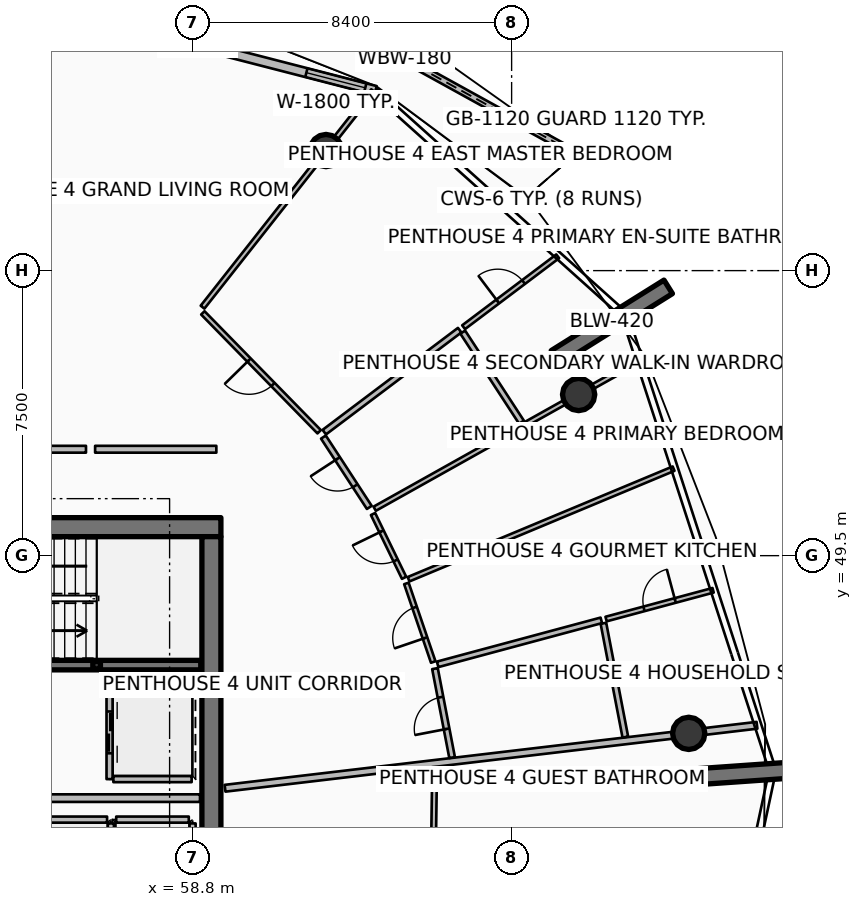
"""IFC4 building model, lengths in metres.
Left out: names, types, materials, properties, quantities, classifications, styles, units other than length and angle.
Written with IfcOpenShell. Run it as: python <this file> out.ifc"""

import sys

from ifc_helpers import new_model, si_unit, direction, frame, frame_2d, origin, origin_2d, place, context, subcontext, project, spatial, polyline, rectangle, hollow_rectangle, circle, outline, extrude, element, fill, save


model = new_model("IFC4")
c1 = context("Model", 3, precision=1e-05, world=origin(), true_north=direction((0.0, 1.0)))
c2 = subcontext(c1, "Body", "Model", "MODEL_VIEW")
j1 = project(units=[si_unit("LENGTHUNIT", "METRE"), si_unit("PLANEANGLEUNIT", "RADIAN")], contexts=[c1])
p1 = place(None, origin())
s1 = spatial("IfcSite", under=j1, at=p1, CompositionType="ELEMENT")
p2 = place(p1, origin())
s2 = spatial("IfcBuilding", under=s1, at=p2, CompositionType="ELEMENT")
p3 = place(p2, frame((0.0, 0.0, 338.9)))
s3 = spatial("IfcBuildingStorey", under=s2, at=p3, CompositionType="ELEMENT", Elevation=338.9)
p4 = place(p3, frame((49.95, 50.25, 0.0), z_axis=(0.0, 0.0, 1.0), x_axis=(1.0, 0.0, 0.0)))
e1 = element("IfcWall", 1, at=p4, inside=s3, PredefinedType="SHEAR", context=c2, shape_type="SweptSolid", body=[
    extrude(rectangle(XDim=9.6, YDim=0.5, at=frame_2d((4.8, 0.0))), origin(), (0.0, 0.0, 1.0), 4.2),
])
p5 = place(p3, frame((59.3, 34.0, 0.0), z_axis=(0.0, 0.0, 1.0), x_axis=(0.0, 1.0, 0.0)))
e2 = element("IfcWall", 2, at=p5, inside=s3, PredefinedType="SHEAR", context=c2, shape_type="SweptSolid", body=[
    extrude(rectangle(XDim=16.0, YDim=0.5, at=frame_2d((8.0, 0.0))), origin(), (0.0, 0.0, 1.0), 4.2),
])
p6 = place(p3, frame((56.28, 46.62, 0.0), z_axis=(0.0, 0.0, 1.0), x_axis=(1.0, 0.0, 0.0)))
e3 = element("IfcColumn", 3, at=p6, inside=s3, PredefinedType="COLUMN", context=c2, shape_type="SweptSolid", body=[
    extrude(hollow_rectangle(XDim=0.2, YDim=0.2, WallThickness=0.01, InnerFilletRadius=0.01, OuterFilletRadius=0.02, at=origin_2d()), origin(), (0.0, 0.0, 1.0), 1.895),
])
for number, where, z_axis, x_axis in (
    (4, (68.353, 54.718, 0.0), (0.0, 0.0, 1.0), (0.848, 0.53, 0.0)),
    (5, (71.941, 43.674, 0.0), (0.0, 0.0, 1.0), (0.998, 0.07, 0.0)),
):
    element("IfcWall", number, at=place(p3, frame(where, z_axis=z_axis, x_axis=x_axis)), inside=s3, PredefinedType="SOLIDWALL", context=c2, shape_type="SweptSolid", body=[
        extrude(rectangle(XDim=3.5, YDim=0.42, at=frame_2d((1.75, 0.0))), origin(), (0.0, 0.0, 1.0), 4.2),
    ])
for number, where, z_axis, x_axis in (
    (6, (68.963, 53.74, 0.0), (0.0, 0.0, 1.0), (1.0, 0.0, 0.0)),
    (7, (62.316, 60.159, 0.0), (0.0, 0.0, 1.0), (1.0, 0.0, 0.0)),
    (8, (71.86, 44.824, 0.0), (0.0, 0.0, 1.0), (1.0, 0.0, 0.0)),
):
    element("IfcColumn", number, at=place(p3, frame(where, z_axis=z_axis, x_axis=x_axis)), inside=s3, PredefinedType="COLUMN", context=c2, shape_type="SweptSolid", body=[
        extrude(circle(Radius=0.425, at=origin_2d()), origin(), (0.0, 0.0, 1.0), 3.8),
    ])
p7 = place(p3, frame((68.897, 60.07, 0.0), z_axis=(0.0, 0.0, 1.0), x_axis=(-0.875469817093, 0.483272800145, 0.0)))
e9 = element("IfcWall", 9, at=p7, inside=s3, PredefinedType="PARAPET", context=c2, shape_type="SweptSolid", body=[
    extrude(outline(polyline([(0.0, 0.0), (10.302, 0.0), (10.302, 1.148), (5.151, 1.127), (0.0, 1.224), (0.0, 0.0)])), frame((0.0, 0.09, 0.0), z_axis=(0.0, -1.0, 0.0), x_axis=(1.0, 0.0, 0.0)), (0.0, 0.0, 1.0), 0.18),
])
p8 = place(p3, frame((63.62, 61.74, 0.0), z_axis=(0.0, 0.0, 1.0), x_axis=(-0.968389062354, 0.249444630957, 0.0)))
e10 = element("IfcWall", 10, at=p8, inside=s3, PredefinedType="SOLIDWALL", context=c2, shape_type="SweptSolid", body=[
    extrude(rectangle(XDim=9.678, YDim=0.24, at=frame_2d((4.839, 0.0))), origin(), (0.0, 0.0, 1.0), 2.75),
])
p9 = place(p8, frame((7.458, 0.0, 0.0)))
e11 = element("IfcOpeningElement", 11, at=p9, cuts=e10, PredefinedType="OPENING", context=c2, shape_type="SweptSolid", body=[
    extrude(rectangle(XDim=1.45, YDim=2.15, at=frame_2d((0.725, 1.075))), frame((0.0, 0.13, 0.0), z_axis=(0.0, -1.0, 0.0), x_axis=(1.0, 0.0, 0.0)), (0.0, 0.0, 1.0), 0.26),
])
p10 = place(p8, frame((0.28, 0.0, 0.65)))
e12 = element("IfcOpeningElement", 12, at=p10, cuts=e10, PredefinedType="OPENING", context=c2, shape_type="SweptSolid", body=[
    extrude(rectangle(XDim=1.6, YDim=1.5, at=frame_2d((0.8, 0.75))), frame((0.0, 0.13, 0.0), z_axis=(0.0, -1.0, 0.0), x_axis=(1.0, 0.0, 0.0)), (0.0, 0.0, 1.0), 0.26),
])
p11 = place(p3, frame((51.48, 46.62, 0.0), z_axis=(0.0, 0.0, 1.0), x_axis=(1.0, 0.0, 0.0)))
e13 = element("IfcWall", 13, at=p11, inside=s3, PredefinedType="SOLIDWALL", context=c2, shape_type="SweptSolid", body=[
    extrude(rectangle(XDim=7.54, YDim=0.25, at=frame_2d((3.77, 0.0))), origin(), (0.0, 0.0, 1.0), 3.8),
])
p12 = place(p11, frame((0.3, 0.0, 0.0)))
e14 = element("IfcOpeningElement", 14, at=p12, cuts=e13, PredefinedType="OPENING", context=c2, shape_type="SweptSolid", body=[
    extrude(rectangle(XDim=1.55, YDim=2.15, at=frame_2d((0.775, 1.075))), frame((0.0, 0.135, 0.0), z_axis=(0.0, -1.0, 0.0), x_axis=(1.0, 0.0, 0.0)), (0.0, 0.0, 1.0), 0.27),
])
p13 = place(p3, frame((56.655, 40.845, 0.0), z_axis=(0.0, 0.0, 1.0), x_axis=(0.0, 1.0, 0.0)))
e15 = element("IfcWall", 15, at=p13, inside=s3, PredefinedType="PARTITIONING", context=c2, shape_type="SweptSolid", body=[
    extrude(rectangle(XDim=1.61, YDim=0.16, at=frame_2d((0.805, 0.0))), origin(), (0.0, 0.0, 1.0), 3.8),
])
p14 = place(p3, frame((54.645, 42.555, 0.0), z_axis=(0.0, 0.0, 1.0), x_axis=(1.0, 0.0, 0.0)))
e16 = element("IfcWall", 16, at=p14, inside=s3, PredefinedType="PARTITIONING", context=c2, shape_type="SweptSolid", body=[
    extrude(rectangle(XDim=1.91, YDim=0.16, at=frame_2d((0.955, 0.0))), origin(), (0.0, 0.0, 1.0), 3.8),
])
p15 = place(p3, frame((58.805, 40.845, 0.0), z_axis=(0.0, 0.0, 1.0), x_axis=(0.0, 1.0, 0.0)))
e17 = element("IfcWall", 17, at=p15, inside=s3, PredefinedType="PARTITIONING", context=c2, shape_type="SweptSolid", body=[
    extrude(rectangle(XDim=1.61, YDim=0.16, at=frame_2d((0.805, 0.0))), origin(), (0.0, 0.0, 1.0), 3.8),
])
p16 = place(p3, frame((56.795, 42.555, 0.0), z_axis=(0.0, 0.0, 1.0), x_axis=(1.0, 0.0, 0.0)))
e18 = element("IfcWall", 18, at=p16, inside=s3, PredefinedType="PARTITIONING", context=c2, shape_type="SweptSolid", body=[
    extrude(rectangle(XDim=1.91, YDim=0.16, at=frame_2d((0.955, 0.0))), origin(), (0.0, 0.0, 1.0), 3.8),
])
p17 = place(p3, frame((56.62, 46.08, 0.0), z_axis=(0.0, 0.0, 1.0), x_axis=(0.0, -1.0, 0.0)))
e19 = element("IfcWall", 19, at=p17, inside=s3, PredefinedType="PARTITIONING", context=c2, shape_type="SweptSolid", body=[
    extrude(rectangle(XDim=2.46, YDim=0.16, at=frame_2d((1.23, 0.0))), origin(), (0.0, 0.0, 1.0), 3.8),
])
p18 = place(p17, frame((0.68, 0.0, 0.0)))
e20 = element("IfcOpeningElement", 20, at=p18, cuts=e19, PredefinedType="OPENING", context=c2, shape_type="SweptSolid", body=[
    extrude(rectangle(XDim=1.1, YDim=2.1, at=frame_2d((0.55, 1.05))), frame((0.0, 0.09, 0.0), z_axis=(0.0, -1.0, 0.0), x_axis=(1.0, 0.0, 0.0)), (0.0, 0.0, 1.0), 0.18),
])
for number, where, z_axis, x_axis in (
    (21, (56.72, 46.08, 0.0), (0.0, 0.0, 1.0), (1.0, 0.0, 0.0)),
    (22, (56.72, 43.62, 0.0), (0.0, 0.0, 1.0), (1.0, 0.0, 0.0)),
):
    element("IfcWall", number, at=place(p3, frame(where, z_axis=z_axis, x_axis=x_axis)), inside=s3, PredefinedType="PARTITIONING", context=c2, shape_type="SweptSolid", body=[
        extrude(rectangle(XDim=2.06, YDim=0.16, at=frame_2d((1.03, 0.0))), origin(), (0.0, 0.0, 1.0), 3.8),
    ])
p19 = place(p3, frame((50.12, 43.12, 0.0), z_axis=(0.0, 0.0, 1.0), x_axis=(1.0, 0.0, 0.0)))
e23 = element("IfcWall", 23, at=p19, inside=s3, PredefinedType="PARTITIONING", context=c2, shape_type="SweptSolid", body=[
    extrude(rectangle(XDim=8.88, YDim=0.2, at=frame_2d((4.44, 0.0))), origin(), (0.0, 0.0, 1.0), 3.8),
])
p20 = place(p3, frame((59.659, 43.38, 0.0), z_axis=(0.0, 0.0, 1.0), x_axis=(0.993068307517, 0.117538660041, 0.0)))
e24 = element("IfcWall", 24, at=p20, inside=s3, PredefinedType="PARTITIONING", context=c2, shape_type="SweptSolid", body=[
    extrude(rectangle(XDim=14.095, YDim=0.18, at=frame_2d((7.048, 0.0))), origin(), (0.0, 0.0, 1.0), 3.24),
])
p21 = place(p3, frame((65.11, 39.542, 0.0), z_axis=(0.0, 0.0, 1.0), x_axis=(0.014677317906, 0.999892282368, 0.0)))
e25 = element("IfcWall", 25, at=p21, inside=s3, PredefinedType="PARTITIONING", context=c2, shape_type="SweptSolid", body=[
    extrude(rectangle(XDim=4.391, YDim=0.125, at=frame_2d((2.196, 0.0))), origin(), (0.0, 0.0, 1.0), 3.24),
])
p22 = place(p21, frame((1.746, 0.0, 0.0)))
e26 = element("IfcOpeningElement", 26, at=p22, cuts=e25, PredefinedType="OPENING", context=c2, shape_type="SweptSolid", body=[
    extrude(rectangle(XDim=0.9, YDim=2.08, at=frame_2d((0.45, 1.04))), frame((0.0, 0.073, 0.0), z_axis=(0.0, -1.0, 0.0), x_axis=(1.0, 0.0, 0.0)), (0.0, 0.0, 1.0), 0.145),
])
p23 = place(p3, frame((56.0, 52.3, 0.0), z_axis=(0.0, 0.0, 1.0), x_axis=(-1.0, 0.0, 0.0)))
e27 = element("IfcWall", 27, at=p23, inside=s3, PredefinedType="PARTITIONING", context=c2, shape_type="SweptSolid", body=[
    extrude(rectangle(XDim=4.975, YDim=0.18, at=frame_2d((2.488, 0.0))), origin(), (0.0, 0.0, 1.0), 3.24),
])
p24 = place(p23, frame((1.938, 0.0, 0.0)))
e28 = element("IfcOpeningElement", 28, at=p24, cuts=e27, PredefinedType="OPENING", context=c2, shape_type="SweptSolid", body=[
    extrude(rectangle(XDim=1.1, YDim=2.1, at=frame_2d((0.55, 1.05))), frame((0.0, 0.1, 0.0), z_axis=(0.0, -1.0, 0.0), x_axis=(1.0, 0.0, 0.0)), (0.0, 0.0, 1.0), 0.2),
])
p25 = place(p3, frame((65.634, 44.188, 0.0), z_axis=(0.0, 0.0, 1.0), x_axis=(-0.189079126285, 0.981961854658, 0.0)))
e29 = element("IfcWall", 29, at=p25, inside=s3, PredefinedType="PARTITIONING", context=c2, shape_type="SweptSolid", body=[
    extrude(rectangle(XDim=2.384, YDim=0.15, at=frame_2d((1.192, 0.0))), origin(), (0.0, 0.0, 1.0), 3.24),
])
p26 = place(p25, frame((0.767, 0.0, 0.0)))
e30 = element("IfcOpeningElement", 30, at=p26, cuts=e29, PredefinedType="OPENING", context=c2, shape_type="SweptSolid", body=[
    extrude(rectangle(XDim=0.85, YDim=2.06, at=frame_2d((0.425, 1.03))), frame((0.0, 0.085, 0.0), z_axis=(0.0, -1.0, 0.0), x_axis=(1.0, 0.0, 0.0)), (0.0, 0.0, 1.0), 0.17),
])
p27 = place(p3, frame((70.192, 44.727, 0.0), z_axis=(0.0, 0.0, 1.0), x_axis=(-0.189180095144, 0.981942407477, 0.0)))
e31 = element("IfcWall", 31, at=p27, inside=s3, PredefinedType="PARTITIONING", context=c2, shape_type="SweptSolid", body=[
    extrude(rectangle(XDim=3.048, YDim=0.15, at=frame_2d((1.524, 0.0))), origin(), (0.0, 0.0, 1.0), 3.24),
])
p28 = place(p3, frame((65.253, 46.64, 0.0), z_axis=(0.0, 0.0, 1.0), x_axis=(0.96569498994, 0.259679006477, 0.0)))
e32 = element("IfcWall", 32, at=p28, inside=s3, PredefinedType="PARTITIONING", context=c2, shape_type="SweptSolid", body=[
    extrude(rectangle(XDim=4.46, YDim=0.15, at=frame_2d((2.23, 0.0))), origin(), (0.0, 0.0, 1.0), 3.24),
])
p29 = place(p3, frame((69.686, 47.832, 0.0), z_axis=(0.0, 0.0, 1.0), x_axis=(0.965675542132, 0.259751318242, 0.0)))
e33 = element("IfcWall", 33, at=p29, inside=s3, PredefinedType="PARTITIONING", context=c2, shape_type="SweptSolid", body=[
    extrude(rectangle(XDim=2.917, YDim=0.125, at=frame_2d((1.458, 0.0))), origin(), (0.0, 0.0, 1.0), 3.24),
])
p30 = place(p29, frame((1.033, 0.0, 0.0)))
e34 = element("IfcOpeningElement", 34, at=p30, cuts=e33, PredefinedType="OPENING", context=c2, shape_type="SweptSolid", body=[
    extrude(rectangle(XDim=0.85, YDim=2.06, at=frame_2d((0.425, 1.03))), frame((0.0, 0.073, 0.0), z_axis=(0.0, -1.0, 0.0), x_axis=(1.0, 0.0, 0.0)), (0.0, 0.0, 1.0), 0.145),
])
p31 = place(p3, frame((64.488, 48.88, 0.0), z_axis=(0.0, 0.0, 1.0), x_axis=(0.922882765435, 0.385081032075, 0.0)))
e35 = element("IfcWall", 35, at=p31, inside=s3, PredefinedType="PARTITIONING", context=c2, shape_type="SweptSolid", body=[
    extrude(rectangle(XDim=7.557, YDim=0.125, at=frame_2d((3.778, 0.0))), origin(), (0.0, 0.0, 1.0), 3.24),
])
p32 = place(p3, frame((65.137, 46.702, 0.0), z_axis=(0.0, 0.0, 1.0), x_axis=(-0.323158498211, 0.946344855237, 0.0)))
e36 = element("IfcWall", 36, at=p32, inside=s3, PredefinedType="PARTITIONING", context=c2, shape_type="SweptSolid", body=[
    extrude(rectangle(XDim=2.185, YDim=0.125, at=frame_2d((1.092, 0.0))), origin(), (0.0, 0.0, 1.0), 3.24),
])
p33 = place(p32, frame((0.667, 0.0, 0.0)))
e37 = element("IfcOpeningElement", 37, at=p33, cuts=e36, PredefinedType="OPENING", context=c2, shape_type="SweptSolid", body=[
    extrude(rectangle(XDim=0.85, YDim=2.06, at=frame_2d((0.425, 1.03))), frame((0.0, 0.073, 0.0), z_axis=(0.0, -1.0, 0.0), x_axis=(1.0, 0.0, 0.0)), (0.0, 0.0, 1.0), 0.145),
])
p34 = place(p3, frame((64.37, 48.917, 0.0), z_axis=(0.0, 0.0, 1.0), x_axis=(-0.437562887643, 0.899187810948, 0.0)))
e38 = element("IfcWall", 38, at=p34, inside=s3, PredefinedType="PARTITIONING", context=c2, shape_type="SweptSolid", body=[
    extrude(rectangle(XDim=1.867, YDim=0.125, at=frame_2d((0.934, 0.0))), origin(), (0.0, 0.0, 1.0), 3.24),
])
p35 = place(p34, frame((0.509, 0.0, 0.0)))
e39 = element("IfcOpeningElement", 39, at=p35, cuts=e38, PredefinedType="OPENING", context=c2, shape_type="SweptSolid", body=[
    extrude(rectangle(XDim=0.85, YDim=2.06, at=frame_2d((0.425, 1.03))), frame((0.0, 0.073, 0.0), z_axis=(0.0, -1.0, 0.0), x_axis=(1.0, 0.0, 0.0)), (0.0, 0.0, 1.0), 0.145),
])
p36 = place(p3, frame((59.43, 52.3, 0.0), z_axis=(0.0, 0.0, 1.0), x_axis=(-1.0, 0.0, 0.0)))
e40 = element("IfcWall", 40, at=p36, inside=s3, PredefinedType="PARTITIONING", context=c2, shape_type="SweptSolid", body=[
    extrude(rectangle(XDim=3.19, YDim=0.18, at=frame_2d((1.595, 0.0))), origin(), (0.0, 0.0, 1.0), 3.24),
])
p37 = place(p3, frame((63.597, 50.735, 0.0), z_axis=(0.0, 0.0, 1.0), x_axis=(0.872502877723, 0.488608972865, 0.0)))
e41 = element("IfcWall", 41, at=p37, inside=s3, PredefinedType="PARTITIONING", context=c2, shape_type="SweptSolid", body=[
    extrude(rectangle(XDim=7.96, YDim=0.125, at=frame_2d((3.98, 0.0))), origin(), (0.0, 0.0, 1.0), 3.24),
])
p38 = place(p3, frame((59.067, 56.038, 0.0), z_axis=(0.0, 0.0, 1.0), x_axis=(0.619090647654, 0.785319533685, 0.0)))
e42 = element("IfcWall", 42, at=p38, inside=s3, PredefinedType="PARTITIONING", context=c2, shape_type="SweptSolid", body=[
    extrude(rectangle(XDim=7.251, YDim=0.125, at=frame_2d((3.625, 0.0))), origin(), (0.0, 0.0, 1.0), 3.24),
])
p39 = place(p3, frame((63.455, 50.77, 0.0), z_axis=(0.0, 0.0, 1.0), x_axis=(-0.546385741331, 0.837533654052, 0.0)))
e43 = element("IfcWall", 43, at=p39, inside=s3, PredefinedType="PARTITIONING", context=c2, shape_type="SweptSolid", body=[
    extrude(rectangle(XDim=2.209, YDim=0.15, at=frame_2d((1.105, 0.0))), origin(), (0.0, 0.0, 1.0), 3.24),
])
p40 = place(p39, frame((0.68, 0.0, 0.0)))
e44 = element("IfcOpeningElement", 44, at=p40, cuts=e43, PredefinedType="OPENING", context=c2, shape_type="SweptSolid", body=[
    extrude(rectangle(XDim=0.85, YDim=2.06, at=frame_2d((0.425, 1.03))), frame((0.0, 0.085, 0.0), z_axis=(0.0, -1.0, 0.0), x_axis=(1.0, 0.0, 0.0)), (0.0, 0.0, 1.0), 0.17),
])
p41 = place(p3, frame((67.46, 53.012, 0.0), z_axis=(0.0, 0.0, 1.0), x_axis=(-0.546428345771, 0.83750585845, 0.0)))
e45 = element("IfcWall", 45, at=p41, inside=s3, PredefinedType="PARTITIONING", context=c2, shape_type="SweptSolid", body=[
    extrude(rectangle(XDim=2.829, YDim=0.15, at=frame_2d((1.415, 0.0))), origin(), (0.0, 0.0, 1.0), 3.24),
])
p42 = place(p3, frame((62.27, 52.75, 0.0), z_axis=(0.0, 0.0, 1.0), x_axis=(0.798737068945, 0.601680226278, 0.0)))
e46 = element("IfcWall", 46, at=p42, inside=s3, PredefinedType="PARTITIONING", context=c2, shape_type="SweptSolid", body=[
    extrude(rectangle(XDim=4.46, YDim=0.15, at=frame_2d((2.23, 0.0))), origin(), (0.0, 0.0, 1.0), 3.24),
])
p43 = place(p3, frame((65.937, 55.511, 0.0), z_axis=(0.0, 0.0, 1.0), x_axis=(0.798731839866, 0.601687167874, 0.0)))
e47 = element("IfcWall", 47, at=p43, inside=s3, PredefinedType="PARTITIONING", context=c2, shape_type="SweptSolid", body=[
    extrude(rectangle(XDim=3.1, YDim=0.125, at=frame_2d((1.55, 0.0))), origin(), (0.0, 0.0, 1.0), 3.24),
])
p44 = place(p43, frame((1.125, 0.0, 0.0)))
e48 = element("IfcOpeningElement", 48, at=p44, cuts=e47, PredefinedType="OPENING", context=c2, shape_type="SweptSolid", body=[
    extrude(rectangle(XDim=0.85, YDim=2.06, at=frame_2d((0.425, 1.03))), frame((0.0, 0.073, 0.0), z_axis=(0.0, -1.0, 0.0), x_axis=(1.0, 0.0, 0.0)), (0.0, 0.0, 1.0), 0.145),
])
p45 = place(p3, frame((62.135, 52.76, 0.0), z_axis=(0.0, 0.0, 1.0), x_axis=(-0.699310266819, 0.714818264121, 0.0)))
e49 = element("IfcWall", 49, at=p45, inside=s3, PredefinedType="PARTITIONING", context=c2, shape_type="SweptSolid", body=[
    extrude(rectangle(XDim=4.376, YDim=0.125, at=frame_2d((2.188, 0.0))), origin(), (0.0, 0.0, 1.0), 3.24),
])
p46 = place(p45, frame((1.738, 0.0, 0.0)))
e50 = element("IfcOpeningElement", 50, at=p46, cuts=e49, PredefinedType="OPENING", context=c2, shape_type="SweptSolid", body=[
    extrude(rectangle(XDim=0.9, YDim=2.08, at=frame_2d((0.45, 1.04))), frame((0.0, 0.073, 0.0), z_axis=(0.0, -1.0, 0.0), x_axis=(1.0, 0.0, 0.0)), (0.0, 0.0, 1.0), 0.145),
])
p47 = place(p10, origin())
e51 = element("IfcWindow", 51, at=p47, inside=s3, PartitioningType="SINGLE_PANEL", PredefinedType="WINDOW", context=c2, shape_type="SweptSolid", body=[
    extrude(rectangle(XDim=1.6, YDim=1.5, at=frame_2d((0.8, 0.75))), frame((0.0, 0.03, 0.0), z_axis=(0.0, -1.0, 0.0), x_axis=(1.0, 0.0, 0.0)), (0.0, 0.0, 1.0), 0.06),
])
fill(e12, e51)
p48 = place(p18, origin())
e52 = element("IfcDoor", 52, at=p48, inside=s3, OperationType="DOUBLE_DOOR_SLIDING", PredefinedType="DOOR", context=c2, shape_type="SweptSolid", body=[
    extrude(rectangle(XDim=1.1, YDim=2.1, at=frame_2d((0.55, 1.05))), frame((0.0, 0.025, 0.0), z_axis=(0.0, -1.0, 0.0), x_axis=(1.0, 0.0, 0.0)), (0.0, 0.0, 1.0), 0.05),
])
fill(e20, e52)
p49 = place(p26, origin())
e53 = element("IfcDoor", 53, at=p49, inside=s3, OperationType="SINGLE_SWING_LEFT", PredefinedType="DOOR", context=c2, shape_type="SweptSolid", body=[
    extrude(rectangle(XDim=0.85, YDim=2.06, at=frame_2d((0.425, 1.03))), frame((0.0, 0.025, 0.0), z_axis=(0.0, -1.0, 0.0), x_axis=(1.0, 0.0, 0.0)), (0.0, 0.0, 1.0), 0.05),
])
fill(e30, e53)
p50 = place(p30, origin())
e54 = element("IfcDoor", 54, at=p50, inside=s3, OperationType="SINGLE_SWING_RIGHT", PredefinedType="DOOR", context=c2, shape_type="SweptSolid", body=[
    extrude(rectangle(XDim=0.85, YDim=2.06, at=frame_2d((0.425, 1.03))), frame((0.0, 0.025, 0.0), z_axis=(0.0, -1.0, 0.0), x_axis=(1.0, 0.0, 0.0)), (0.0, 0.0, 1.0), 0.05),
])
fill(e34, e54)
p51 = place(p33, origin())
e55 = element("IfcDoor", 55, at=p51, inside=s3, OperationType="SINGLE_SWING_LEFT", PredefinedType="DOOR", context=c2, shape_type="SweptSolid", body=[
    extrude(rectangle(XDim=0.85, YDim=2.06, at=frame_2d((0.425, 1.03))), frame((0.0, 0.025, 0.0), z_axis=(0.0, -1.0, 0.0), x_axis=(1.0, 0.0, 0.0)), (0.0, 0.0, 1.0), 0.05),
])
fill(e37, e55)
p52 = place(p35, origin())
e56 = element("IfcDoor", 56, at=p52, inside=s3, OperationType="SINGLE_SWING_RIGHT", PredefinedType="DOOR", context=c2, shape_type="SweptSolid", body=[
    extrude(rectangle(XDim=0.85, YDim=2.06, at=frame_2d((0.425, 1.03))), frame((0.0, 0.025, 0.0), z_axis=(0.0, -1.0, 0.0), x_axis=(1.0, 0.0, 0.0)), (0.0, 0.0, 1.0), 0.05),
])
fill(e39, e56)
p53 = place(p40, origin())
e57 = element("IfcDoor", 57, at=p53, inside=s3, OperationType="SINGLE_SWING_RIGHT", PredefinedType="DOOR", context=c2, shape_type="SweptSolid", body=[
    extrude(rectangle(XDim=0.85, YDim=2.06, at=frame_2d((0.425, 1.03))), frame((0.0, 0.025, 0.0), z_axis=(0.0, -1.0, 0.0), x_axis=(1.0, 0.0, 0.0)), (0.0, 0.0, 1.0), 0.05),
])
fill(e44, e57)
p54 = place(p44, origin())
e58 = element("IfcDoor", 58, at=p54, inside=s3, OperationType="SINGLE_SWING_LEFT", PredefinedType="DOOR", context=c2, shape_type="SweptSolid", body=[
    extrude(rectangle(XDim=0.85, YDim=2.06, at=frame_2d((0.425, 1.03))), frame((0.0, 0.025, 0.0), z_axis=(0.0, -1.0, 0.0), x_axis=(1.0, 0.0, 0.0)), (0.0, 0.0, 1.0), 0.05),
])
fill(e48, e58)
p55 = place(p46, origin())
e59 = element("IfcDoor", 59, at=p55, inside=s3, OperationType="SINGLE_SWING_RIGHT", PredefinedType="DOOR", context=c2, shape_type="SweptSolid", body=[
    extrude(rectangle(XDim=0.9, YDim=2.08, at=frame_2d((0.45, 1.04))), frame((0.0, 0.025, 0.0), z_axis=(0.0, -1.0, 0.0), x_axis=(1.0, 0.0, 0.0)), (0.0, 0.0, 1.0), 0.05),
])
fill(e50, e59)
save(model, sys.argv[1])
